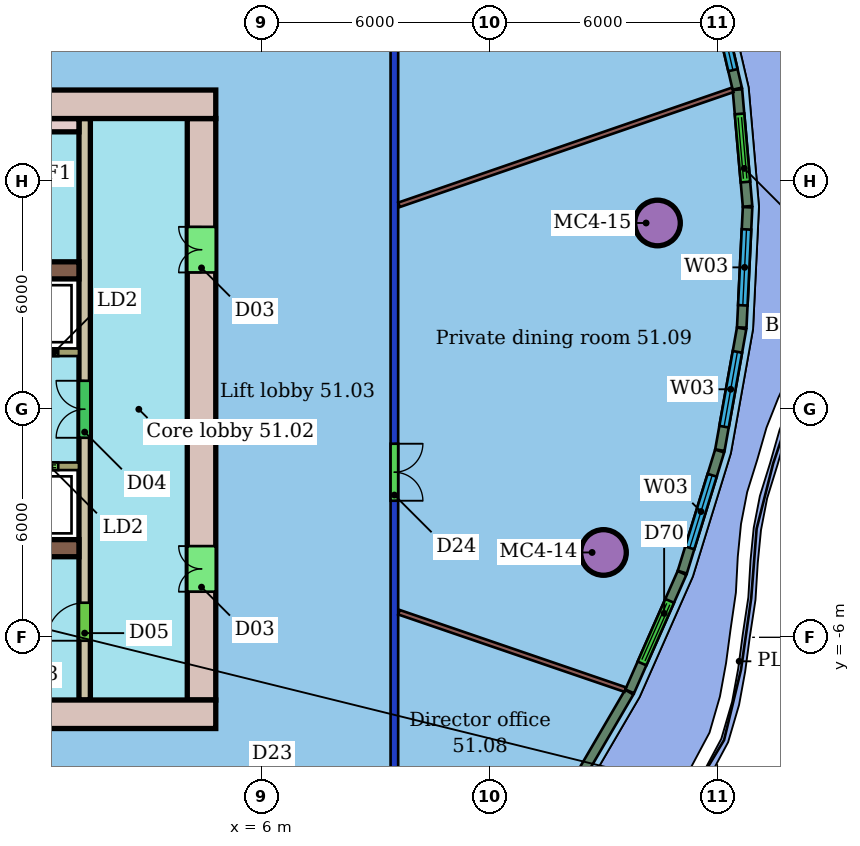
"""IFC4 building model, lengths in metres.
Left out: names, types, materials, properties, quantities, classifications, styles, units other than length and angle.
Written with IfcOpenShell. Run it as: python <this file> out.ifc"""

import sys

from ifc_helpers import new_model, si_unit, direction, frame, frame_2d, origin, origin_2d, place, context, subcontext, project, spatial, rectangle, hollow_circle, extrude, element, fill, save


model = new_model("IFC4")
c1 = context("Model", 3, precision=1e-05, world=origin(), true_north=direction((0.0, 1.0)))
c2 = subcontext(c1, "Body", "Model", "MODEL_VIEW")
j1 = project(units=[si_unit("LENGTHUNIT", "METRE"), si_unit("PLANEANGLEUNIT", "RADIAN")], contexts=[c1])
p1 = place(None, origin())
s1 = spatial("IfcSite", under=j1, at=p1, CompositionType="ELEMENT")
p2 = place(p1, origin())
s2 = spatial("IfcBuilding", under=s1, at=p2, CompositionType="ELEMENT")
p3 = place(p2, frame((0.0, 0.0, 210.1)))
s3 = spatial("IfcBuildingStorey", under=s2, at=p3, CompositionType="ELEMENT", Elevation=210.1)
for number, where, z_axis, x_axis in (
    (1, (15.003, -3.768, 0.0), (0.0, 0.0, 1.0), (1.0, 0.0, 0.0)),
    (2, (16.424, 4.901, 0.0), (0.0, 0.0, 1.0), (1.0, 0.0, 0.0)),
):
    element("IfcColumn", number, at=place(p3, frame(where, z_axis=z_axis, x_axis=x_axis)), inside=s3, PredefinedType="COLUMN", context=c2, shape_type="SweptSolid", body=[
        extrude(hollow_circle(Radius=0.6, WallThickness=0.045, at=origin_2d()), origin(), (0.0, 0.0, 1.0), 3.45),
    ])
p4 = place(p3, frame((9.5, 10.4, 0.0), z_axis=(0.0, 0.0, 1.0), x_axis=(0.0, -1.0, 0.0)))
e3 = element("IfcWall", 3, at=p4, inside=s3, PredefinedType="PARTITIONING", context=c2, shape_type="SweptSolid", body=[
    extrude(rectangle(XDim=20.8, YDim=0.2, at=frame_2d((10.4, 0.0))), origin(), (0.0, 0.0, 1.0), 3.05),
])
p5 = place(p4, frame((11.307, 0.0, 0.0)))
e4 = element("IfcOpeningElement", 4, at=p5, cuts=e3, PredefinedType="OPENING", context=c2, shape_type="SweptSolid", body=[
    extrude(rectangle(XDim=1.5, YDim=2.1, at=frame_2d((0.75, 1.05))), frame((0.0, 0.11, 0.0), z_axis=(0.0, -1.0, 0.0), x_axis=(1.0, 0.0, 0.0)), (0.0, 0.0, 1.0), 0.22),
])
p6 = place(p3, frame((15.576, -7.376, 0.0), z_axis=(0.0, 0.0, 1.0), x_axis=(-0.946227116855, 0.323503080863, 0.0)))
e5 = element("IfcWall", 5, at=p6, inside=s3, PredefinedType="PARTITIONING", context=c2, shape_type="SweptSolid", body=[
    extrude(rectangle(XDim=6.294, YDim=0.125, at=frame_2d((3.147, 0.0))), origin(), (0.0, 0.0, 1.0), 3.45),
])
p7 = place(p3, frame((18.402, 8.403, 0.0), z_axis=(0.0, 0.0, 1.0), x_axis=(-0.945508934878, -0.325596151798, 0.0)))
e6 = element("IfcWall", 6, at=p7, inside=s3, PredefinedType="PARTITIONING", context=c2, shape_type="SweptSolid", body=[
    extrude(rectangle(XDim=9.288, YDim=0.125, at=frame_2d((4.644, 0.0))), origin(), (0.0, 0.0, 1.0), 3.45),
])
p8 = place(p3, frame((13.956, -10.396, 0.0), z_axis=(0.0, 0.0, 1.0), x_axis=(0.504456760021, 0.863436956164, 0.0)))
e7 = element("IfcWall", 7, at=p8, inside=s3, PredefinedType="SOLIDWALL", context=c2, shape_type="SweptSolid", body=[
    extrude(rectangle(XDim=3.42, YDim=0.25, at=frame_2d((1.71, 0.0))), origin(), (0.0, 0.0, 1.0), 3.1),
])
p9 = place(p3, frame((15.691, -7.423, 0.0), z_axis=(0.0, 0.0, 1.0), x_axis=(0.404116447322, 0.914707547254, 0.0)))
e8 = element("IfcWall", 8, at=p9, inside=s3, PredefinedType="SOLIDWALL", context=c2, shape_type="SweptSolid", body=[
    extrude(rectangle(XDim=3.407, YDim=0.25, at=frame_2d((1.704, 0.0))), origin(), (0.0, 0.0, 1.0), 3.1),
])
p10 = place(p9, frame((0.804, 0.0, 0.0)))
e9 = element("IfcOpeningElement", 9, at=p10, cuts=e8, PredefinedType="OPENING", context=c2, shape_type="SweptSolid", body=[
    extrude(rectangle(XDim=1.8, YDim=2.4, at=frame_2d((0.9, 1.2))), frame((0.0, 0.135, 0.0), z_axis=(0.0, -1.0, 0.0), x_axis=(1.0, 0.0, 0.0)), (0.0, 0.0, 1.0), 0.27),
])
p11 = place(p3, frame((17.076, -4.285, 0.0), z_axis=(0.0, 0.0, 1.0), x_axis=(0.294651514305, 0.955604774537, 0.0)))
e10 = element("IfcWall", 10, at=p11, inside=s3, PredefinedType="SOLIDWALL", context=c2, shape_type="SweptSolid", body=[
    extrude(rectangle(XDim=3.336, YDim=0.25, at=frame_2d((1.668, 0.0))), origin(), (0.0, 0.0, 1.0), 3.1),
])
p12 = place(p11, frame((0.668, 0.0, 0.9)))
e11 = element("IfcOpeningElement", 11, at=p12, cuts=e10, PredefinedType="OPENING", context=c2, shape_type="SweptSolid", body=[
    extrude(rectangle(XDim=2.0, YDim=2.1, at=frame_2d((1.0, 1.05))), frame((0.0, 0.135, 0.0), z_axis=(0.0, -1.0, 0.0), x_axis=(1.0, 0.0, 0.0)), (0.0, 0.0, 1.0), 0.27),
])
p13 = place(p3, frame((18.065, -1.075, 0.0), z_axis=(0.0, 0.0, 1.0), x_axis=(0.176006154206, 0.984389066214, 0.0)))
e12 = element("IfcWall", 12, at=p13, inside=s3, PredefinedType="SOLIDWALL", context=c2, shape_type="SweptSolid", body=[
    extrude(rectangle(XDim=3.254, YDim=0.25, at=frame_2d((1.627, 0.0))), origin(), (0.0, 0.0, 1.0), 3.1),
])
p14 = place(p13, frame((0.627, 0.0, 0.9)))
e13 = element("IfcOpeningElement", 13, at=p14, cuts=e12, PredefinedType="OPENING", context=c2, shape_type="SweptSolid", body=[
    extrude(rectangle(XDim=2.0, YDim=2.1, at=frame_2d((1.0, 1.05))), frame((0.0, 0.135, 0.0), z_axis=(0.0, -1.0, 0.0), x_axis=(1.0, 0.0, 0.0)), (0.0, 0.0, 1.0), 0.27),
])
p15 = place(p3, frame((18.64, 2.152, 0.0), z_axis=(0.0, 0.0, 1.0), x_axis=(0.048561254051, 0.998820206346, 0.0)))
e14 = element("IfcWall", 14, at=p15, inside=s3, PredefinedType="SOLIDWALL", context=c2, shape_type="SweptSolid", body=[
    extrude(rectangle(XDim=3.167, YDim=0.25, at=frame_2d((1.583, 0.0))), origin(), (0.0, 0.0, 1.0), 3.1),
])
p16 = place(p15, frame((0.584, 0.0, 0.9)))
e15 = element("IfcOpeningElement", 15, at=p16, cuts=e14, PredefinedType="OPENING", context=c2, shape_type="SweptSolid", body=[
    extrude(rectangle(XDim=2.0, YDim=2.1, at=frame_2d((1.0, 1.05))), frame((0.0, 0.135, 0.0), z_axis=(0.0, -1.0, 0.0), x_axis=(1.0, 0.0, 0.0)), (0.0, 0.0, 1.0), 0.27),
])
p17 = place(p3, frame((18.793, 5.341, 0.0), z_axis=(0.0, 0.0, 1.0), x_axis=(-0.086527038648, 0.996249502676, 0.0)))
e16 = element("IfcWall", 16, at=p17, inside=s3, PredefinedType="SOLIDWALL", context=c2, shape_type="SweptSolid", body=[
    extrude(rectangle(XDim=3.081, YDim=0.25, at=frame_2d((1.541, 0.0))), origin(), (0.0, 0.0, 1.0), 3.1),
])
p18 = place(p17, frame((0.641, 0.0, 0.0)))
e17 = element("IfcOpeningElement", 17, at=p18, cuts=e16, PredefinedType="OPENING", context=c2, shape_type="SweptSolid", body=[
    extrude(rectangle(XDim=1.8, YDim=2.4, at=frame_2d((0.9, 1.2))), frame((0.0, 0.135, 0.0), z_axis=(0.0, -1.0, 0.0), x_axis=(1.0, 0.0, 0.0)), (0.0, 0.0, 1.0), 0.27),
])
p19 = place(p3, frame((18.523, 8.436, 0.0), z_axis=(0.0, 0.0, 1.0), x_axis=(-0.226926203239, 0.973911956125, 0.0)))
e18 = element("IfcWall", 18, at=p19, inside=s3, PredefinedType="SOLIDWALL", context=c2, shape_type="SweptSolid", body=[
    extrude(rectangle(XDim=3.002, YDim=0.25, at=frame_2d((1.501, 0.0))), origin(), (0.0, 0.0, 1.0), 3.1),
])
p20 = place(p19, frame((0.501, 0.0, 0.9)))
e19 = element("IfcOpeningElement", 19, at=p20, cuts=e18, PredefinedType="OPENING", context=c2, shape_type="SweptSolid", body=[
    extrude(rectangle(XDim=2.0, YDim=2.1, at=frame_2d((1.0, 1.05))), frame((0.0, 0.135, 0.0), z_axis=(0.0, -1.0, 0.0), x_axis=(1.0, 0.0, 0.0)), (0.0, 0.0, 1.0), 0.27),
])
p21 = place(p3, frame((4.8, 8.025, 0.0), z_axis=(0.0, 0.0, 1.0), x_axis=(-1.0, 0.0, 0.0)))
e20 = element("IfcWall", 20, at=p21, inside=s3, PredefinedType="SHEAR", context=c2, shape_type="SweptSolid", body=[
    extrude(rectangle(XDim=10.8, YDim=0.75, at=frame_2d((5.4, 0.0))), origin(), (0.0, 0.0, 1.0), 3.3),
])
p22 = place(p21, frame((4.4, 0.0, 0.0)))
e21 = element("IfcOpeningElement", 21, at=p22, cuts=e20, PredefinedType="OPENING", context=c2, shape_type="SweptSolid", body=[
    extrude(rectangle(XDim=1.2, YDim=2.1, at=frame_2d((0.6, 1.05))), frame((0.0, 0.385, 0.0), z_axis=(0.0, -1.0, 0.0), x_axis=(1.0, 0.0, 0.0)), (0.0, 0.0, 1.0), 0.77),
])
p23 = place(p3, frame((-16.8, -8.025, 0.0), z_axis=(0.0, 0.0, 1.0), x_axis=(1.0, 0.0, 0.0)))
e22 = element("IfcWall", 22, at=p23, inside=s3, PredefinedType="SHEAR", context=c2, shape_type="SweptSolid", body=[
    extrude(rectangle(XDim=21.6, YDim=0.75, at=frame_2d((10.8, 0.0))), origin(), (0.0, 0.0, 1.0), 3.3),
])
p24 = place(p23, frame((4.8, 0.0, 0.0)))
e23 = element("IfcOpeningElement", 23, at=p24, cuts=e22, PredefinedType="OPENING", context=c2, shape_type="SweptSolid", body=[
    extrude(rectangle(XDim=1.2, YDim=2.1, at=frame_2d((0.6, 1.05))), frame((0.0, 0.385, 0.0), z_axis=(0.0, -1.0, 0.0), x_axis=(1.0, 0.0, 0.0)), (0.0, 0.0, 1.0), 0.77),
])
p25 = place(p3, frame((4.425, -7.65, 0.0), z_axis=(0.0, 0.0, 1.0), x_axis=(0.0, 1.0, 0.0)))
e24 = element("IfcWall", 24, at=p25, inside=s3, PredefinedType="SHEAR", context=c2, shape_type="SweptSolid", body=[
    extrude(rectangle(XDim=15.3, YDim=0.75, at=frame_2d((7.65, 0.0))), origin(), (0.0, 0.0, 1.0), 3.3),
])
p26 = place(p25, frame((2.85, 0.0, 0.0)))
e25 = element("IfcOpeningElement", 25, at=p26, cuts=e24, PredefinedType="OPENING", context=c2, shape_type="SweptSolid", body=[
    extrude(rectangle(XDim=1.2, YDim=2.1, at=frame_2d((0.6, 1.05))), frame((0.0, 0.385, 0.0), z_axis=(0.0, -1.0, 0.0), x_axis=(1.0, 0.0, 0.0)), (0.0, 0.0, 1.0), 0.77),
])
p27 = place(p25, frame((11.25, 0.0, 0.0)))
e26 = element("IfcOpeningElement", 26, at=p27, cuts=e24, PredefinedType="OPENING", context=c2, shape_type="SweptSolid", body=[
    extrude(rectangle(XDim=1.2, YDim=2.1, at=frame_2d((0.6, 1.05))), frame((0.0, 0.385, 0.0), z_axis=(0.0, -1.0, 0.0), x_axis=(1.0, 0.0, 0.0)), (0.0, 0.0, 1.0), 0.77),
])
for number, where, z_axis, x_axis in (
    (27, (-6.0, 3.655, 0.0), (0.0, 0.0, 1.0), (1.0, 0.0, 0.0)),
    (28, (-6.0, -3.655, 0.0), (0.0, 0.0, 1.0), (1.0, 0.0, 0.0)),
):
    element("IfcWall", number, at=place(p3, frame(where, z_axis=z_axis, x_axis=x_axis)), inside=s3, PredefinedType="SHEAR", context=c2, shape_type="SweptSolid", body=[
        extrude(rectangle(XDim=7.2, YDim=0.45, at=frame_2d((3.6, 0.0))), origin(), (0.0, 0.0, 1.0), 3.3),
    ])
p28 = place(p3, frame((1.35, -7.65, 0.0), z_axis=(0.0, 0.0, 1.0), x_axis=(0.0, 1.0, 0.0)))
e29 = element("IfcWall", 29, at=p28, inside=s3, PredefinedType="SHEAR", context=c2, shape_type="SweptSolid", body=[
    extrude(rectangle(XDim=15.3, YDim=0.3, at=frame_2d((7.65, 0.0))), origin(), (0.0, 0.0, 1.0), 3.3),
])
p29 = place(p28, frame((1.56, 0.0, 0.0)))
e30 = element("IfcOpeningElement", 30, at=p29, cuts=e29, PredefinedType="OPENING", context=c2, shape_type="SweptSolid", body=[
    extrude(rectangle(XDim=1.0, YDim=2.1, at=frame_2d((0.5, 1.05))), frame((0.0, 0.16, 0.0), z_axis=(0.0, -1.0, 0.0), x_axis=(1.0, 0.0, 0.0)), (0.0, 0.0, 1.0), 0.32),
])
p30 = place(p28, frame((6.9, 0.0, 0.0)))
e31 = element("IfcOpeningElement", 31, at=p30, cuts=e29, PredefinedType="OPENING", context=c2, shape_type="SweptSolid", body=[
    extrude(rectangle(XDim=1.5, YDim=2.1, at=frame_2d((0.75, 1.05))), frame((0.0, 0.16, 0.0), z_axis=(0.0, -1.0, 0.0), x_axis=(1.0, 0.0, 0.0)), (0.0, 0.0, 1.0), 0.32),
])
p31 = place(p3, frame((-13.2, 1.5, 0.0), z_axis=(0.0, 0.0, 1.0), x_axis=(1.0, 0.0, 0.0)))
e32 = element("IfcWall", 32, at=p31, inside=s3, PredefinedType="SHEAR", context=c2, shape_type="SweptSolid", body=[
    extrude(rectangle(XDim=14.4, YDim=0.2, at=frame_2d((7.2, 0.0))), origin(), (0.0, 0.0, 1.0), 3.3),
])
p32 = place(p31, frame((10.312, 0.0, 0.0)))
e33 = element("IfcOpeningElement", 33, at=p32, cuts=e32, PredefinedType="OPENING", context=c2, shape_type="SweptSolid", body=[
    extrude(rectangle(XDim=1.1, YDim=2.1, at=frame_2d((0.55, 1.05))), frame((0.0, 0.11, 0.0), z_axis=(0.0, -1.0, 0.0), x_axis=(1.0, 0.0, 0.0)), (0.0, 0.0, 1.0), 0.22),
])
p33 = place(p31, frame((12.754, 0.0, 0.0)))
e34 = element("IfcOpeningElement", 34, at=p33, cuts=e32, PredefinedType="OPENING", context=c2, shape_type="SweptSolid", body=[
    extrude(rectangle(XDim=1.1, YDim=2.1, at=frame_2d((0.55, 1.05))), frame((0.0, 0.11, 0.0), z_axis=(0.0, -1.0, 0.0), x_axis=(1.0, 0.0, 0.0)), (0.0, 0.0, 1.0), 0.22),
])
p34 = place(p31, frame((0.15, 0.0, 0.0)))
e35 = element("IfcOpeningElement", 35, at=p34, cuts=e32, PredefinedType="OPENING", context=c2, shape_type="SweptSolid", body=[
    extrude(rectangle(XDim=0.9, YDim=2.1, at=frame_2d((0.45, 1.05))), frame((0.0, 0.11, 0.0), z_axis=(0.0, -1.0, 0.0), x_axis=(1.0, 0.0, 0.0)), (0.0, 0.0, 1.0), 0.22),
])
p35 = place(p31, frame((4.983, 0.0, 0.0)))
e36 = element("IfcOpeningElement", 36, at=p35, cuts=e32, PredefinedType="OPENING", context=c2, shape_type="SweptSolid", body=[
    extrude(rectangle(XDim=0.9, YDim=2.1, at=frame_2d((0.45, 1.05))), frame((0.0, 0.11, 0.0), z_axis=(0.0, -1.0, 0.0), x_axis=(1.0, 0.0, 0.0)), (0.0, 0.0, 1.0), 0.22),
])
p36 = place(p3, frame((1.2, -1.5, 0.0), z_axis=(0.0, 0.0, 1.0), x_axis=(-1.0, 0.0, 0.0)))
e37 = element("IfcWall", 37, at=p36, inside=s3, PredefinedType="SHEAR", context=c2, shape_type="SweptSolid", body=[
    extrude(rectangle(XDim=14.4, YDim=0.2, at=frame_2d((7.2, 0.0))), origin(), (0.0, 0.0, 1.0), 3.3),
])
p37 = place(p36, frame((7.821, 0.0, 0.0)))
e38 = element("IfcOpeningElement", 38, at=p37, cuts=e37, PredefinedType="OPENING", context=c2, shape_type="SweptSolid", body=[
    extrude(rectangle(XDim=1.2, YDim=2.1, at=frame_2d((0.6, 1.05))), frame((0.0, 0.11, 0.0), z_axis=(0.0, -1.0, 0.0), x_axis=(1.0, 0.0, 0.0)), (0.0, 0.0, 1.0), 0.22),
])
p38 = place(p36, frame((0.546, 0.0, 0.0)))
e39 = element("IfcOpeningElement", 39, at=p38, cuts=e37, PredefinedType="OPENING", context=c2, shape_type="SweptSolid", body=[
    extrude(rectangle(XDim=1.1, YDim=2.1, at=frame_2d((0.55, 1.05))), frame((0.0, 0.11, 0.0), z_axis=(0.0, -1.0, 0.0), x_axis=(1.0, 0.0, 0.0)), (0.0, 0.0, 1.0), 0.22),
])
p39 = place(p36, frame((4.983, 0.0, 0.0)))
e40 = element("IfcOpeningElement", 40, at=p39, cuts=e37, PredefinedType="OPENING", context=c2, shape_type="SweptSolid", body=[
    extrude(rectangle(XDim=1.0, YDim=2.1, at=frame_2d((0.5, 1.05))), frame((0.0, 0.11, 0.0), z_axis=(0.0, -1.0, 0.0), x_axis=(1.0, 0.0, 0.0)), (0.0, 0.0, 1.0), 0.22),
])
p40 = place(p36, frame((2.592, 0.0, 0.0)))
e41 = element("IfcOpeningElement", 41, at=p40, cuts=e37, PredefinedType="OPENING", context=c2, shape_type="SweptSolid", body=[
    extrude(rectangle(XDim=1.0, YDim=2.1, at=frame_2d((0.5, 1.05))), frame((0.0, 0.11, 0.0), z_axis=(0.0, -1.0, 0.0), x_axis=(1.0, 0.0, 0.0)), (0.0, 0.0, 1.0), 0.22),
])
p41 = place(p3, frame((0.4, 7.475, 0.0), z_axis=(0.0, 0.0, 1.0), x_axis=(1.0, 0.0, 0.0)))
e42 = element("IfcWall", 42, at=p41, inside=s3, PredefinedType="SHEAR", context=c2, shape_type="SweptSolid", body=[
    extrude(rectangle(XDim=0.8, YDim=0.35, at=frame_2d((0.4, 0.0))), origin(), (0.0, 0.0, 1.0), 3.3),
])
p42 = place(p5, origin())
e43 = element("IfcDoor", 43, at=p42, inside=s3, OperationType="DOUBLE_DOOR_SINGLE_SWING", PredefinedType="DOOR", context=c2, shape_type="SweptSolid", body=[
    extrude(rectangle(XDim=1.5, YDim=2.1, at=frame_2d((0.75, 1.05))), frame((0.0, 0.025, 0.0), z_axis=(0.0, -1.0, 0.0), x_axis=(1.0, 0.0, 0.0)), (0.0, 0.0, 1.0), 0.05),
])
fill(e4, e43)
p43 = place(p10, origin())
e44 = element("IfcDoor", 44, at=p43, inside=s3, OperationType="DOUBLE_DOOR_SLIDING", PredefinedType="DOOR", context=c2, shape_type="SweptSolid", body=[
    extrude(rectangle(XDim=1.8, YDim=2.4, at=frame_2d((0.9, 1.2))), frame((0.0, 0.025, 0.0), z_axis=(0.0, -1.0, 0.0), x_axis=(1.0, 0.0, 0.0)), (0.0, 0.0, 1.0), 0.05),
])
fill(e9, e44)
p44 = place(p12, origin())
e45 = element("IfcWindow", 45, at=p44, inside=s3, PartitioningType="SINGLE_PANEL", PredefinedType="WINDOW", context=c2, shape_type="SweptSolid", body=[
    extrude(rectangle(XDim=2.0, YDim=2.1, at=frame_2d((1.0, 1.05))), frame((0.0, 0.03, 0.0), z_axis=(0.0, -1.0, 0.0), x_axis=(1.0, 0.0, 0.0)), (0.0, 0.0, 1.0), 0.06),
])
fill(e11, e45)
p45 = place(p14, origin())
e46 = element("IfcWindow", 46, at=p45, inside=s3, PartitioningType="SINGLE_PANEL", PredefinedType="WINDOW", context=c2, shape_type="SweptSolid", body=[
    extrude(rectangle(XDim=2.0, YDim=2.1, at=frame_2d((1.0, 1.05))), frame((0.0, 0.03, 0.0), z_axis=(0.0, -1.0, 0.0), x_axis=(1.0, 0.0, 0.0)), (0.0, 0.0, 1.0), 0.06),
])
fill(e13, e46)
p46 = place(p16, origin())
e47 = element("IfcWindow", 47, at=p46, inside=s3, PartitioningType="SINGLE_PANEL", PredefinedType="WINDOW", context=c2, shape_type="SweptSolid", body=[
    extrude(rectangle(XDim=2.0, YDim=2.1, at=frame_2d((1.0, 1.05))), frame((0.0, 0.03, 0.0), z_axis=(0.0, -1.0, 0.0), x_axis=(1.0, 0.0, 0.0)), (0.0, 0.0, 1.0), 0.06),
])
fill(e15, e47)
p47 = place(p18, origin())
e48 = element("IfcDoor", 48, at=p47, inside=s3, OperationType="DOUBLE_DOOR_SLIDING", PredefinedType="DOOR", context=c2, shape_type="SweptSolid", body=[
    extrude(rectangle(XDim=1.8, YDim=2.4, at=frame_2d((0.9, 1.2))), frame((0.0, 0.025, 0.0), z_axis=(0.0, -1.0, 0.0), x_axis=(1.0, 0.0, 0.0)), (0.0, 0.0, 1.0), 0.05),
])
fill(e17, e48)
p48 = place(p20, origin())
e49 = element("IfcWindow", 49, at=p48, inside=s3, PartitioningType="SINGLE_PANEL", PredefinedType="WINDOW", context=c2, shape_type="SweptSolid", body=[
    extrude(rectangle(XDim=2.0, YDim=2.1, at=frame_2d((1.0, 1.05))), frame((0.0, 0.03, 0.0), z_axis=(0.0, -1.0, 0.0), x_axis=(1.0, 0.0, 0.0)), (0.0, 0.0, 1.0), 0.06),
])
fill(e19, e49)
p49 = place(p26, origin())
e50 = element("IfcDoor", 50, at=p49, inside=s3, OperationType="DOUBLE_DOOR_SINGLE_SWING", PredefinedType="NOTDEFINED", context=c2, shape_type="SweptSolid", body=[
    extrude(rectangle(XDim=1.2, YDim=2.1, at=frame_2d((0.6, 1.05))), frame((0.0, 0.025, 0.0), z_axis=(0.0, -1.0, 0.0), x_axis=(1.0, 0.0, 0.0)), (0.0, 0.0, 1.0), 0.05),
])
fill(e25, e50)
p50 = place(p27, origin())
e51 = element("IfcDoor", 51, at=p50, inside=s3, OperationType="DOUBLE_DOOR_SINGLE_SWING", PredefinedType="NOTDEFINED", context=c2, shape_type="SweptSolid", body=[
    extrude(rectangle(XDim=1.2, YDim=2.1, at=frame_2d((0.6, 1.05))), frame((0.0, 0.025, 0.0), z_axis=(0.0, -1.0, 0.0), x_axis=(1.0, 0.0, 0.0)), (0.0, 0.0, 1.0), 0.05),
])
fill(e26, e51)
p51 = place(p29, origin())
e52 = element("IfcDoor", 52, at=p51, inside=s3, OperationType="SINGLE_SWING_LEFT", PredefinedType="NOTDEFINED", context=c2, shape_type="SweptSolid", body=[
    extrude(rectangle(XDim=1.0, YDim=2.1, at=frame_2d((0.5, 1.05))), frame((0.0, 0.025, 0.0), z_axis=(0.0, -1.0, 0.0), x_axis=(1.0, 0.0, 0.0)), (0.0, 0.0, 1.0), 0.05),
])
fill(e30, e52)
p52 = place(p30, origin())
e53 = element("IfcDoor", 53, at=p52, inside=s3, OperationType="DOUBLE_DOOR_SINGLE_SWING", PredefinedType="NOTDEFINED", context=c2, shape_type="SweptSolid", body=[
    extrude(rectangle(XDim=1.5, YDim=2.1, at=frame_2d((0.75, 1.05))), frame((0.0, 0.025, 0.0), z_axis=(0.0, -1.0, 0.0), x_axis=(1.0, 0.0, 0.0)), (0.0, 0.0, 1.0), 0.05),
])
fill(e31, e53)
p53 = place(p33, origin())
e54 = element("IfcDoor", 54, at=p53, inside=s3, OperationType="DOUBLE_DOOR_SLIDING", PredefinedType="NOTDEFINED", context=c2, shape_type="SweptSolid", body=[
    extrude(rectangle(XDim=1.1, YDim=2.1, at=frame_2d((0.55, 1.05))), frame((0.0, 0.025, 0.0), z_axis=(0.0, -1.0, 0.0), x_axis=(1.0, 0.0, 0.0)), (0.0, 0.0, 1.0), 0.05),
])
fill(e34, e54)
p54 = place(p38, origin())
e55 = element("IfcDoor", 55, at=p54, inside=s3, OperationType="DOUBLE_DOOR_SLIDING", PredefinedType="NOTDEFINED", context=c2, shape_type="SweptSolid", body=[
    extrude(rectangle(XDim=1.1, YDim=2.1, at=frame_2d((0.55, 1.05))), frame((0.0, 0.025, 0.0), z_axis=(0.0, -1.0, 0.0), x_axis=(1.0, 0.0, 0.0)), (0.0, 0.0, 1.0), 0.05),
])
fill(e39, e55)
save(model, sys.argv[1])
